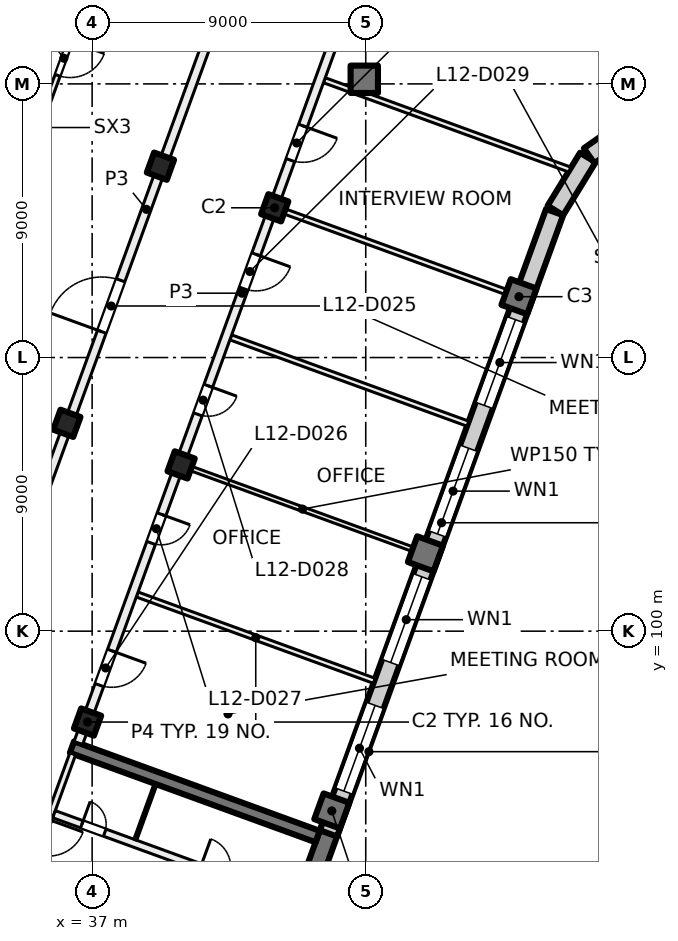
"""IFC4 building model, lengths in metres.
Left out: names, types, materials, properties, quantities, classifications, styles, units other than length and angle.
Written with IfcOpenShell. Run it as: python <this file> out.ifc"""

import sys

from ifc_helpers import new_model, si_unit, direction, frame, frame_2d, origin, origin_2d, place, context, subcontext, project, spatial, rectangle, extrude, element, fill, save


model = new_model("IFC4")
c1 = context("Model", 3, precision=1e-05, world=origin(), true_north=direction((0.0, 1.0)))
c2 = subcontext(c1, "Body", "Model", "MODEL_VIEW")
j1 = project(units=[si_unit("LENGTHUNIT", "METRE"), si_unit("PLANEANGLEUNIT", "RADIAN")], contexts=[c1])
p1 = place(None, origin())
s1 = spatial("IfcSite", under=j1, at=p1, CompositionType="ELEMENT")
p2 = place(p1, origin())
s2 = spatial("IfcBuilding", under=s1, at=p2, CompositionType="ELEMENT")
p3 = place(p2, frame((0.0, 0.0, 55.5)))
s3 = spatial("IfcBuildingStorey", under=s2, at=p3, CompositionType="ELEMENT", Elevation=55.5)
p4 = place(p3, frame((45.952, 118.152, 0.0), z_axis=(0.0, 0.0, 1.0), x_axis=(1.0, 0.0, 0.0)))
e1 = element("IfcColumn", 1, at=p4, inside=s3, PredefinedType="COLUMN", context=c2, shape_type="SweptSolid", body=[
    extrude(rectangle(XDim=0.9, YDim=0.9, at=origin_2d()), origin(), (0.0, 0.0, 1.0), 4.0),
])
for number, where, z_axis, x_axis in (
    (2, (43.006, 113.925, 0.0), (0.0, 0.0, 1.0), (-0.342, -0.94, 0.0)),
    (3, (39.927, 105.468, 0.0), (0.0, 0.0, 1.0), (-0.342, -0.94, 0.0)),
    (4, (36.849, 97.011, 0.0), (0.0, 0.0, 1.0), (-0.342, -0.94, 0.0)),
    (5, (39.247, 115.293, 0.0), (0.0, 0.0, 1.0), (-0.342, -0.94, 0.0)),
    (6, (36.169, 106.836, 0.0), (0.0, 0.0, 1.0), (-0.342, -0.94, 0.0)),
):
    element("IfcColumn", number, at=place(p3, frame(where, z_axis=z_axis, x_axis=x_axis)), inside=s3, PredefinedType="COLUMN", context=c2, shape_type="SweptSolid", body=[
        extrude(rectangle(XDim=0.7, YDim=0.7, at=origin_2d()), origin(), (0.0, 0.0, 1.0), 4.0),
    ])
for number, where, z_axis, x_axis in (
    (7, (51.04, 111.001, 0.0), (0.0, 0.0, 1.0), (-0.342, -0.94, 0.0)),
    (8, (47.962, 102.544, 0.0), (0.0, 0.0, 1.0), (-0.342, -0.94, 0.0)),
    (9, (44.884, 94.087, 0.0), (0.0, 0.0, 1.0), (-0.342, -0.94, 0.0)),
):
    element("IfcColumn", number, at=place(p3, frame(where, z_axis=z_axis, x_axis=x_axis)), inside=s3, PredefinedType="COLUMN", context=c2, shape_type="SweptSolid", body=[
        extrude(rectangle(XDim=0.9, YDim=0.9, at=origin_2d()), origin(), (0.0, 0.0, 1.0), 4.0),
    ])
p5 = place(p3, frame((41.827, 85.249, 0.0), z_axis=(0.0, 0.0, 1.0), x_axis=(0.342016162452, 0.939694069696, 0.0)))
e10 = element("IfcWall", 10, at=p5, inside=s3, PredefinedType="SHEAR", context=c2, shape_type="SweptSolid", body=[
    extrude(rectangle(XDim=8.9, YDim=0.6, at=frame_2d((4.45, 0.0))), origin(), (0.0, 0.0, 1.0), 4.0),
])
p6 = place(p3, frame((44.418, 93.245, 0.0), z_axis=(0.0, 0.0, 1.0), x_axis=(-0.93969060187, 0.342025690201, 0.0)))
e11 = element("IfcWall", 11, at=p6, inside=s3, PredefinedType="SHEAR", context=c2, shape_type="SweptSolid", body=[
    extrude(rectangle(XDim=8.6, YDim=0.4, at=frame_2d((4.3, 0.0))), origin(), (0.0, 0.0, 1.0), 4.0),
])
p7 = place(p3, frame((52.212, 113.783, 0.0), z_axis=(0.0, 0.0, 1.0), x_axis=(-0.34202521188, -0.939690775968, 0.0)))
e12 = element("IfcWall", 12, at=p7, inside=s3, PredefinedType="SOLIDWALL", context=c2, shape_type="SweptSolid", body=[
    extrude(rectangle(XDim=21.745, YDim=0.6, at=frame_2d((10.873, 0.0))), origin(), (0.0, 0.0, 1.0), 3.625),
])
p8 = place(p7, frame((3.765, 0.0, 0.9)))
e13 = element("IfcOpeningElement", 13, at=p8, cuts=e12, PredefinedType="OPENING", context=c2, shape_type="SweptSolid", body=[
    extrude(rectangle(XDim=3.0, YDim=2.4, at=frame_2d((1.5, 1.2))), frame((0.0, 0.31, 0.0), z_axis=(0.0, -1.0, 0.0), x_axis=(1.0, 0.0, 0.0)), (0.0, 0.0, 1.0), 0.62),
])
p9 = place(p7, frame((8.265, 0.0, 0.9)))
e14 = element("IfcOpeningElement", 14, at=p9, cuts=e12, PredefinedType="OPENING", context=c2, shape_type="SweptSolid", body=[
    extrude(rectangle(XDim=3.0, YDim=2.4, at=frame_2d((1.5, 1.2))), frame((0.0, 0.31, 0.0), z_axis=(0.0, -1.0, 0.0), x_axis=(1.0, 0.0, 0.0)), (0.0, 0.0, 1.0), 0.62),
])
p10 = place(p7, frame((12.765, 0.0, 0.9)))
e15 = element("IfcOpeningElement", 15, at=p10, cuts=e12, PredefinedType="OPENING", context=c2, shape_type="SweptSolid", body=[
    extrude(rectangle(XDim=3.0, YDim=2.4, at=frame_2d((1.5, 1.2))), frame((0.0, 0.31, 0.0), z_axis=(0.0, -1.0, 0.0), x_axis=(1.0, 0.0, 0.0)), (0.0, 0.0, 1.0), 0.62),
])
p11 = place(p7, frame((17.265, 0.0, 0.9)))
e16 = element("IfcOpeningElement", 16, at=p11, cuts=e12, PredefinedType="OPENING", context=c2, shape_type="SweptSolid", body=[
    extrude(rectangle(XDim=3.0, YDim=2.4, at=frame_2d((1.5, 1.2))), frame((0.0, 0.31, 0.0), z_axis=(0.0, -1.0, 0.0), x_axis=(1.0, 0.0, 0.0)), (0.0, 0.0, 1.0), 0.62),
])
p12 = place(p3, frame((53.305, 115.578, 0.0), z_axis=(0.0, 0.0, 1.0), x_axis=(-0.522402266438, -0.852699168535, 0.0)))
e17 = element("IfcWall", 17, at=p12, inside=s3, PredefinedType="SOLIDWALL", context=c2, shape_type="SweptSolid", body=[
    extrude(rectangle(XDim=2.042, YDim=0.6, at=frame_2d((1.021, 0.0))), origin(), (0.0, 0.0, 1.0), 3.625),
])
p13 = place(p3, frame((55.062, 116.839, 0.0), z_axis=(0.0, 0.0, 1.0), x_axis=(-0.819122269495, -0.573618956815, 0.0)))
e18 = element("IfcWall", 18, at=p13, inside=s3, PredefinedType="SOLIDWALL", context=c2, shape_type="SweptSolid", body=[
    extrude(rectangle(XDim=2.092, YDim=0.6, at=frame_2d((1.046, 0.0))), origin(), (0.0, 0.0, 1.0), 3.625),
])
p14 = place(p3, frame((24.666, 100.669, 0.0), z_axis=(0.0, 0.0, 1.0), x_axis=(0.34201964167, 0.939692803373, 0.0)))
e19 = element("IfcWall", 19, at=p14, inside=s3, PredefinedType="SOLIDWALL", context=c2, shape_type="SweptSolid", body=[
    extrude(rectangle(XDim=32.884, YDim=0.6, at=frame_2d((16.442, 0.0))), origin(), (0.0, 0.0, 1.0), 3.625),
])
p15 = place(p14, frame((1.48, 0.0, 0.9)))
e20 = element("IfcOpeningElement", 20, at=p15, cuts=e19, PredefinedType="OPENING", context=c2, shape_type="SweptSolid", body=[
    extrude(rectangle(XDim=3.0, YDim=2.4, at=frame_2d((1.5, 1.2))), frame((0.0, 0.31, 0.0), z_axis=(0.0, -1.0, 0.0), x_axis=(1.0, 0.0, 0.0)), (0.0, 0.0, 1.0), 0.62),
])
p16 = place(p14, frame((5.98, 0.0, 0.9)))
e21 = element("IfcOpeningElement", 21, at=p16, cuts=e19, PredefinedType="OPENING", context=c2, shape_type="SweptSolid", body=[
    extrude(rectangle(XDim=3.0, YDim=2.4, at=frame_2d((1.5, 1.2))), frame((0.0, 0.31, 0.0), z_axis=(0.0, -1.0, 0.0), x_axis=(1.0, 0.0, 0.0)), (0.0, 0.0, 1.0), 0.62),
])
p17 = place(p14, frame((10.48, 0.0, 0.9)))
e22 = element("IfcOpeningElement", 22, at=p17, cuts=e19, PredefinedType="OPENING", context=c2, shape_type="SweptSolid", body=[
    extrude(rectangle(XDim=3.0, YDim=2.4, at=frame_2d((1.5, 1.2))), frame((0.0, 0.31, 0.0), z_axis=(0.0, -1.0, 0.0), x_axis=(1.0, 0.0, 0.0)), (0.0, 0.0, 1.0), 0.62),
])
p18 = place(p14, frame((15.58, 0.0, 0.0)))
e23 = element("IfcOpeningElement", 23, at=p18, cuts=e19, PredefinedType="OPENING", context=c2, shape_type="SweptSolid", body=[
    extrude(rectangle(XDim=1.8, YDim=2.4, at=frame_2d((0.9, 1.2))), frame((0.0, 0.31, 0.0), z_axis=(0.0, -1.0, 0.0), x_axis=(1.0, 0.0, 0.0)), (0.0, 0.0, 1.0), 0.62),
])
p19 = place(p14, frame((19.48, 0.0, 0.9)))
e24 = element("IfcOpeningElement", 24, at=p19, cuts=e19, PredefinedType="OPENING", context=c2, shape_type="SweptSolid", body=[
    extrude(rectangle(XDim=3.0, YDim=2.4, at=frame_2d((1.5, 1.2))), frame((0.0, 0.31, 0.0), z_axis=(0.0, -1.0, 0.0), x_axis=(1.0, 0.0, 0.0)), (0.0, 0.0, 1.0), 0.62),
])
p20 = place(p14, frame((23.98, 0.0, 0.9)))
e25 = element("IfcOpeningElement", 25, at=p20, cuts=e19, PredefinedType="OPENING", context=c2, shape_type="SweptSolid", body=[
    extrude(rectangle(XDim=3.0, YDim=2.4, at=frame_2d((1.5, 1.2))), frame((0.0, 0.31, 0.0), z_axis=(0.0, -1.0, 0.0), x_axis=(1.0, 0.0, 0.0)), (0.0, 0.0, 1.0), 0.62),
])
p21 = place(p14, frame((29.08, 0.0, 0.0)))
e26 = element("IfcOpeningElement", 26, at=p21, cuts=e19, PredefinedType="OPENING", context=c2, shape_type="SweptSolid", body=[
    extrude(rectangle(XDim=1.8, YDim=2.4, at=frame_2d((0.9, 1.2))), frame((0.0, 0.31, 0.0), z_axis=(0.0, -1.0, 0.0), x_axis=(1.0, 0.0, 0.0)), (0.0, 0.0, 1.0), 0.62),
])
p22 = place(p3, frame((36.362, 95.964, 0.0), z_axis=(0.0, 0.0, 1.0), x_axis=(-0.341995824804, -0.939701471648, 0.0)))
e27 = element("IfcWall", 27, at=p22, inside=s3, PredefinedType="PARTITIONING", context=c2, shape_type="SweptSolid", body=[
    extrude(rectangle(XDim=3.8, YDim=0.2, at=frame_2d((1.9, 0.0))), origin(), (0.0, 0.0, 1.0), 3.625),
])
p23 = place(p22, frame((2.3, 0.0, 0.0)))
e28 = element("IfcOpeningElement", 28, at=p23, cuts=e27, PredefinedType="OPENING", context=c2, shape_type="SweptSolid", body=[
    extrude(rectangle(XDim=1.2, YDim=2.1, at=frame_2d((0.6, 1.05))), frame((0.0, 0.11, 0.0), z_axis=(0.0, -1.0, 0.0), x_axis=(1.0, 0.0, 0.0)), (0.0, 0.0, 1.0), 0.22),
])
p24 = place(p3, frame((35.19, 92.453, 0.0), z_axis=(0.0, 0.0, 1.0), x_axis=(0.939691552312, -0.342023078919, 0.0)))
e29 = element("IfcWall", 29, at=p24, inside=s3, PredefinedType="PARTITIONING", context=c2, shape_type="SweptSolid", body=[
    extrude(rectangle(XDim=8.4, YDim=0.2, at=frame_2d((4.2, 0.0))), origin(), (0.0, 0.0, 1.0), 3.625),
])
p25 = place(p24, frame((5.25, 0.0, 0.0)))
e30 = element("IfcOpeningElement", 30, at=p25, cuts=e29, PredefinedType="OPENING", context=c2, shape_type="SweptSolid", body=[
    extrude(rectangle(XDim=1.5, YDim=2.1, at=frame_2d((0.75, 1.05))), frame((0.0, 0.11, 0.0), z_axis=(0.0, -1.0, 0.0), x_axis=(1.0, 0.0, 0.0)), (0.0, 0.0, 1.0), 0.22),
])
p26 = place(p3, frame((35.746, 93.98, 0.0), z_axis=(0.0, 0.0, 1.0), x_axis=(0.939691552312, -0.342023078919, 0.0)))
e31 = element("IfcWall", 31, at=p26, inside=s3, PredefinedType="PARTITIONING", context=c2, shape_type="SweptSolid", body=[
    extrude(rectangle(XDim=8.4, YDim=0.25, at=frame_2d((4.2, 0.0))), origin(), (0.0, 0.0, 1.0), 3.625),
])
p27 = place(p26, frame((0.975, 0.0, 0.0)))
e32 = element("IfcOpeningElement", 32, at=p27, cuts=e31, PredefinedType="OPENING", context=c2, shape_type="SweptSolid", body=[
    extrude(rectangle(XDim=0.8, YDim=2.1, at=frame_2d((0.4, 1.05))), frame((0.0, 0.135, 0.0), z_axis=(0.0, -1.0, 0.0), x_axis=(1.0, 0.0, 0.0)), (0.0, 0.0, 1.0), 0.27),
])
p28 = place(p26, frame((5.125, 0.0, 0.0)))
e33 = element("IfcOpeningElement", 33, at=p28, cuts=e31, PredefinedType="OPENING", context=c2, shape_type="SweptSolid", body=[
    extrude(rectangle(XDim=1.0, YDim=2.1, at=frame_2d((0.5, 1.05))), frame((0.0, 0.135, 0.0), z_axis=(0.0, -1.0, 0.0), x_axis=(1.0, 0.0, 0.0)), (0.0, 0.0, 1.0), 0.27),
])
p29 = place(p3, frame((39.087, 94.973, 0.0), z_axis=(0.0, 0.0, 1.0), x_axis=(-0.342024501273, -0.939691034611, 0.0)))
e34 = element("IfcWall", 34, at=p29, inside=s3, PredefinedType="PARTITIONING", context=c2, shape_type="SweptSolid", body=[
    extrude(rectangle(XDim=1.95, YDim=0.1, at=frame_2d((0.975, 0.0))), origin(), (0.0, 0.0, 1.0), 3.625),
])
p30 = place(p3, frame((32.881, 97.657, 0.0), z_axis=(0.0, 0.0, 1.0), x_axis=(0.342017360004, 0.939693633828, 0.0)))
e35 = element("IfcWall", 35, at=p30, inside=s3, PredefinedType="PARTITIONING", context=c2, shape_type="SweptSolid", body=[
    extrude(rectangle(XDim=34.516, YDim=0.3, at=frame_2d((17.258, 0.0))), origin(), (0.0, 0.0, 1.0), 3.625),
])
p31 = place(p30, frame((12.975, 0.0, 0.0)))
e36 = element("IfcOpeningElement", 36, at=p31, cuts=e35, PredefinedType="OPENING", context=c2, shape_type="SweptSolid", body=[
    extrude(rectangle(XDim=1.8, YDim=2.1, at=frame_2d((0.9, 1.05))), frame((0.0, 0.16, 0.0), z_axis=(0.0, -1.0, 0.0), x_axis=(1.0, 0.0, 0.0)), (0.0, 0.0, 1.0), 0.32),
])
p32 = place(p3, frame((36.839, 120.959, 0.0), z_axis=(0.0, 0.0, 1.0), x_axis=(-0.341986974999, -0.939704692407, 0.0)))
e37 = element("IfcWall", 37, at=p32, inside=s3, PredefinedType="PARTITIONING", context=c2, shape_type="SweptSolid", body=[
    extrude(rectangle(XDim=4.5, YDim=0.175, at=frame_2d((2.25, 0.0))), origin(), (0.0, 0.0, 1.0), 3.625),
])
p33 = place(p32, frame((1.65, 0.0, 0.0)))
e38 = element("IfcOpeningElement", 38, at=p33, cuts=e37, PredefinedType="OPENING", context=c2, shape_type="SweptSolid", body=[
    extrude(rectangle(XDim=1.2, YDim=2.1, at=frame_2d((0.6, 1.05))), frame((0.0, 0.097, 0.0), z_axis=(0.0, -1.0, 0.0), x_axis=(1.0, 0.0, 0.0)), (0.0, 0.0, 1.0), 0.195),
])
p34 = place(p3, frame((38.482, 101.206, 0.0), z_axis=(0.0, 0.0, 1.0), x_axis=(0.939687752599, -0.342033518263, 0.0)))
e39 = element("IfcWall", 39, at=p34, inside=s3, PredefinedType="PARTITIONING", context=c2, shape_type="SweptSolid", body=[
    extrude(rectangle(XDim=8.301, YDim=0.175, at=frame_2d((4.15, 0.0))), origin(), (0.0, 0.0, 1.0), 3.625),
])
p35 = place(p3, frame((40.021, 105.434, 0.0), z_axis=(0.0, 0.0, 1.0), x_axis=(0.939687752599, -0.342033518263, 0.0)))
e40 = element("IfcWall", 40, at=p35, inside=s3, PredefinedType="PARTITIONING", context=c2, shape_type="SweptSolid", body=[
    extrude(rectangle(XDim=8.301, YDim=0.15, at=frame_2d((4.15, 0.0))), origin(), (0.0, 0.0, 1.0), 3.625),
])
p36 = place(p3, frame((41.561, 109.663, 0.0), z_axis=(0.0, 0.0, 1.0), x_axis=(0.939673986983, -0.342071334939, 0.0)))
e41 = element("IfcWall", 41, at=p36, inside=s3, PredefinedType="PARTITIONING", context=c2, shape_type="SweptSolid", body=[
    extrude(rectangle(XDim=8.3, YDim=0.175, at=frame_2d((4.15, 0.0))), origin(), (0.0, 0.0, 1.0), 3.625),
])
p37 = place(p3, frame((43.1, 113.891, 0.0), z_axis=(0.0, 0.0, 1.0), x_axis=(0.939670544866, -0.342080790328, 0.0)))
e42 = element("IfcWall", 42, at=p37, inside=s3, PredefinedType="PARTITIONING", context=c2, shape_type="SweptSolid", body=[
    extrude(rectangle(XDim=8.3, YDim=0.175, at=frame_2d((4.15, 0.0))), origin(), (0.0, 0.0, 1.0), 3.625),
])
p38 = place(p3, frame((44.639, 118.12, 0.0), z_axis=(0.0, 0.0, 1.0), x_axis=(0.939669707102, -0.342083091593, 0.0)))
e43 = element("IfcWall", 43, at=p38, inside=s3, PredefinedType="PARTITIONING", context=c2, shape_type="SweptSolid", body=[
    extrude(rectangle(XDim=8.589, YDim=0.175, at=frame_2d((4.295, 0.0))), origin(), (0.0, 0.0, 1.0), 3.625),
])
p39 = place(p3, frame((47.314, 125.909, 0.0), z_axis=(0.0, 0.0, 1.0), x_axis=(-0.342010770371, -0.939696032209, 0.0)))
e44 = element("IfcWall", 44, at=p39, inside=s3, PredefinedType="PARTITIONING", context=c2, shape_type="SweptSolid", body=[
    extrude(rectangle(XDim=31.485, YDim=0.3, at=frame_2d((15.742, 0.0))), origin(), (0.0, 0.0, 1.0), 3.625),
])
p40 = place(p39, frame((28.259, 0.0, 0.0)))
e45 = element("IfcOpeningElement", 45, at=p40, cuts=e44, PredefinedType="OPENING", context=c2, shape_type="SweptSolid", body=[
    extrude(rectangle(XDim=1.2, YDim=2.1, at=frame_2d((0.6, 1.05))), frame((0.0, 0.16, 0.0), z_axis=(0.0, -1.0, 0.0), x_axis=(1.0, 0.0, 0.0)), (0.0, 0.0, 1.0), 0.32),
])
p41 = place(p39, frame((23.484, 0.0, 0.0)))
e46 = element("IfcOpeningElement", 46, at=p41, cuts=e44, PredefinedType="OPENING", context=c2, shape_type="SweptSolid", body=[
    extrude(rectangle(XDim=1.0, YDim=2.1, at=frame_2d((0.5, 1.05))), frame((0.0, 0.16, 0.0), z_axis=(0.0, -1.0, 0.0), x_axis=(1.0, 0.0, 0.0)), (0.0, 0.0, 1.0), 0.32),
])
p42 = place(p39, frame((18.984, 0.0, 0.0)))
e47 = element("IfcOpeningElement", 47, at=p42, cuts=e44, PredefinedType="OPENING", context=c2, shape_type="SweptSolid", body=[
    extrude(rectangle(XDim=1.0, YDim=2.1, at=frame_2d((0.5, 1.05))), frame((0.0, 0.16, 0.0), z_axis=(0.0, -1.0, 0.0), x_axis=(1.0, 0.0, 0.0)), (0.0, 0.0, 1.0), 0.32),
])
p43 = place(p39, frame((14.385, 0.0, 0.0)))
e48 = element("IfcOpeningElement", 48, at=p43, cuts=e44, PredefinedType="OPENING", context=c2, shape_type="SweptSolid", body=[
    extrude(rectangle(XDim=1.2, YDim=2.1, at=frame_2d((0.6, 1.05))), frame((0.0, 0.16, 0.0), z_axis=(0.0, -1.0, 0.0), x_axis=(1.0, 0.0, 0.0)), (0.0, 0.0, 1.0), 0.32),
])
p44 = place(p39, frame((9.885, 0.0, 0.0)))
e49 = element("IfcOpeningElement", 49, at=p44, cuts=e44, PredefinedType="OPENING", context=c2, shape_type="SweptSolid", body=[
    extrude(rectangle(XDim=1.2, YDim=2.1, at=frame_2d((0.6, 1.05))), frame((0.0, 0.16, 0.0), z_axis=(0.0, -1.0, 0.0), x_axis=(1.0, 0.0, 0.0)), (0.0, 0.0, 1.0), 0.32),
])
p45 = place(p39, frame((5.384, 0.0, 0.0)))
e50 = element("IfcOpeningElement", 50, at=p45, cuts=e44, PredefinedType="OPENING", context=c2, shape_type="SweptSolid", body=[
    extrude(rectangle(XDim=1.2, YDim=2.1, at=frame_2d((0.6, 1.05))), frame((0.0, 0.16, 0.0), z_axis=(0.0, -1.0, 0.0), x_axis=(1.0, 0.0, 0.0)), (0.0, 0.0, 1.0), 0.32),
])
p46 = place(p8, origin())
e51 = element("IfcWindow", 51, at=p46, inside=s3, PartitioningType="SINGLE_PANEL", PredefinedType="WINDOW", context=c2, shape_type="SweptSolid", body=[
    extrude(rectangle(XDim=3.0, YDim=2.4, at=frame_2d((1.5, 1.2))), frame((0.0, 0.03, 0.0), z_axis=(0.0, -1.0, 0.0), x_axis=(1.0, 0.0, 0.0)), (0.0, 0.0, 1.0), 0.06),
])
fill(e13, e51)
p47 = place(p9, origin())
e52 = element("IfcWindow", 52, at=p47, inside=s3, PartitioningType="SINGLE_PANEL", PredefinedType="WINDOW", context=c2, shape_type="SweptSolid", body=[
    extrude(rectangle(XDim=3.0, YDim=2.4, at=frame_2d((1.5, 1.2))), frame((0.0, 0.03, 0.0), z_axis=(0.0, -1.0, 0.0), x_axis=(1.0, 0.0, 0.0)), (0.0, 0.0, 1.0), 0.06),
])
fill(e14, e52)
p48 = place(p10, origin())
e53 = element("IfcWindow", 53, at=p48, inside=s3, PartitioningType="SINGLE_PANEL", PredefinedType="WINDOW", context=c2, shape_type="SweptSolid", body=[
    extrude(rectangle(XDim=3.0, YDim=2.4, at=frame_2d((1.5, 1.2))), frame((0.0, 0.03, 0.0), z_axis=(0.0, -1.0, 0.0), x_axis=(1.0, 0.0, 0.0)), (0.0, 0.0, 1.0), 0.06),
])
fill(e15, e53)
p49 = place(p11, origin())
e54 = element("IfcWindow", 54, at=p49, inside=s3, PartitioningType="SINGLE_PANEL", PredefinedType="WINDOW", context=c2, shape_type="SweptSolid", body=[
    extrude(rectangle(XDim=3.0, YDim=2.4, at=frame_2d((1.5, 1.2))), frame((0.0, 0.03, 0.0), z_axis=(0.0, -1.0, 0.0), x_axis=(1.0, 0.0, 0.0)), (0.0, 0.0, 1.0), 0.06),
])
fill(e16, e54)
p50 = place(p27, origin())
e55 = element("IfcDoor", 55, at=p50, inside=s3, OperationType="SINGLE_SWING_RIGHT", PredefinedType="DOOR", context=c2, shape_type="SweptSolid", body=[
    extrude(rectangle(XDim=0.8, YDim=2.1, at=frame_2d((0.4, 1.05))), frame((0.0, 0.025, 0.0), z_axis=(0.0, -1.0, 0.0), x_axis=(1.0, 0.0, 0.0)), (0.0, 0.0, 1.0), 0.05),
])
fill(e32, e55)
p51 = place(p33, origin())
e56 = element("IfcDoor", 56, at=p51, inside=s3, OperationType="DOUBLE_DOOR_SINGLE_SWING", PredefinedType="DOOR", context=c2, shape_type="SweptSolid", body=[
    extrude(rectangle(XDim=1.2, YDim=2.1, at=frame_2d((0.6, 1.05))), frame((0.0, 0.025, 0.0), z_axis=(0.0, -1.0, 0.0), x_axis=(1.0, 0.0, 0.0)), (0.0, 0.0, 1.0), 0.05),
])
fill(e38, e56)
p52 = place(p31, origin())
e57 = element("IfcDoor", 57, at=p52, inside=s3, OperationType="DOUBLE_DOOR_SINGLE_SWING", PredefinedType="DOOR", context=c2, shape_type="SweptSolid", body=[
    extrude(rectangle(XDim=1.8, YDim=2.1, at=frame_2d((0.9, 1.05))), frame((0.0, 0.025, 0.0), z_axis=(0.0, -1.0, 0.0), x_axis=(1.0, 0.0, 0.0)), (0.0, 0.0, 1.0), 0.05),
])
fill(e36, e57)
p53 = place(p40, origin())
e58 = element("IfcDoor", 58, at=p53, inside=s3, OperationType="DOUBLE_DOOR_SINGLE_SWING", PredefinedType="DOOR", context=c2, shape_type="SweptSolid", body=[
    extrude(rectangle(XDim=1.2, YDim=2.1, at=frame_2d((0.6, 1.05))), frame((0.0, 0.025, 0.0), z_axis=(0.0, -1.0, 0.0), x_axis=(1.0, 0.0, 0.0)), (0.0, 0.0, 1.0), 0.05),
])
fill(e45, e58)
p54 = place(p41, origin())
e59 = element("IfcDoor", 59, at=p54, inside=s3, OperationType="SINGLE_SWING_LEFT", PredefinedType="DOOR", context=c2, shape_type="SweptSolid", body=[
    extrude(rectangle(XDim=1.0, YDim=2.1, at=frame_2d((0.5, 1.05))), frame((0.0, 0.025, 0.0), z_axis=(0.0, -1.0, 0.0), x_axis=(1.0, 0.0, 0.0)), (0.0, 0.0, 1.0), 0.05),
])
fill(e46, e59)
p55 = place(p42, origin())
e60 = element("IfcDoor", 60, at=p55, inside=s3, OperationType="SINGLE_SWING_LEFT", PredefinedType="DOOR", context=c2, shape_type="SweptSolid", body=[
    extrude(rectangle(XDim=1.0, YDim=2.1, at=frame_2d((0.5, 1.05))), frame((0.0, 0.025, 0.0), z_axis=(0.0, -1.0, 0.0), x_axis=(1.0, 0.0, 0.0)), (0.0, 0.0, 1.0), 0.05),
])
fill(e47, e60)
p56 = place(p43, origin())
e61 = element("IfcDoor", 61, at=p56, inside=s3, OperationType="DOUBLE_DOOR_SINGLE_SWING", PredefinedType="DOOR", context=c2, shape_type="SweptSolid", body=[
    extrude(rectangle(XDim=1.2, YDim=2.1, at=frame_2d((0.6, 1.05))), frame((0.0, 0.025, 0.0), z_axis=(0.0, -1.0, 0.0), x_axis=(1.0, 0.0, 0.0)), (0.0, 0.0, 1.0), 0.05),
])
fill(e48, e61)
p57 = place(p44, origin())
e62 = element("IfcDoor", 62, at=p57, inside=s3, OperationType="DOUBLE_DOOR_SINGLE_SWING", PredefinedType="DOOR", context=c2, shape_type="SweptSolid", body=[
    extrude(rectangle(XDim=1.2, YDim=2.1, at=frame_2d((0.6, 1.05))), frame((0.0, 0.025, 0.0), z_axis=(0.0, -1.0, 0.0), x_axis=(1.0, 0.0, 0.0)), (0.0, 0.0, 1.0), 0.05),
])
fill(e49, e62)
save(model, sys.argv[1])
